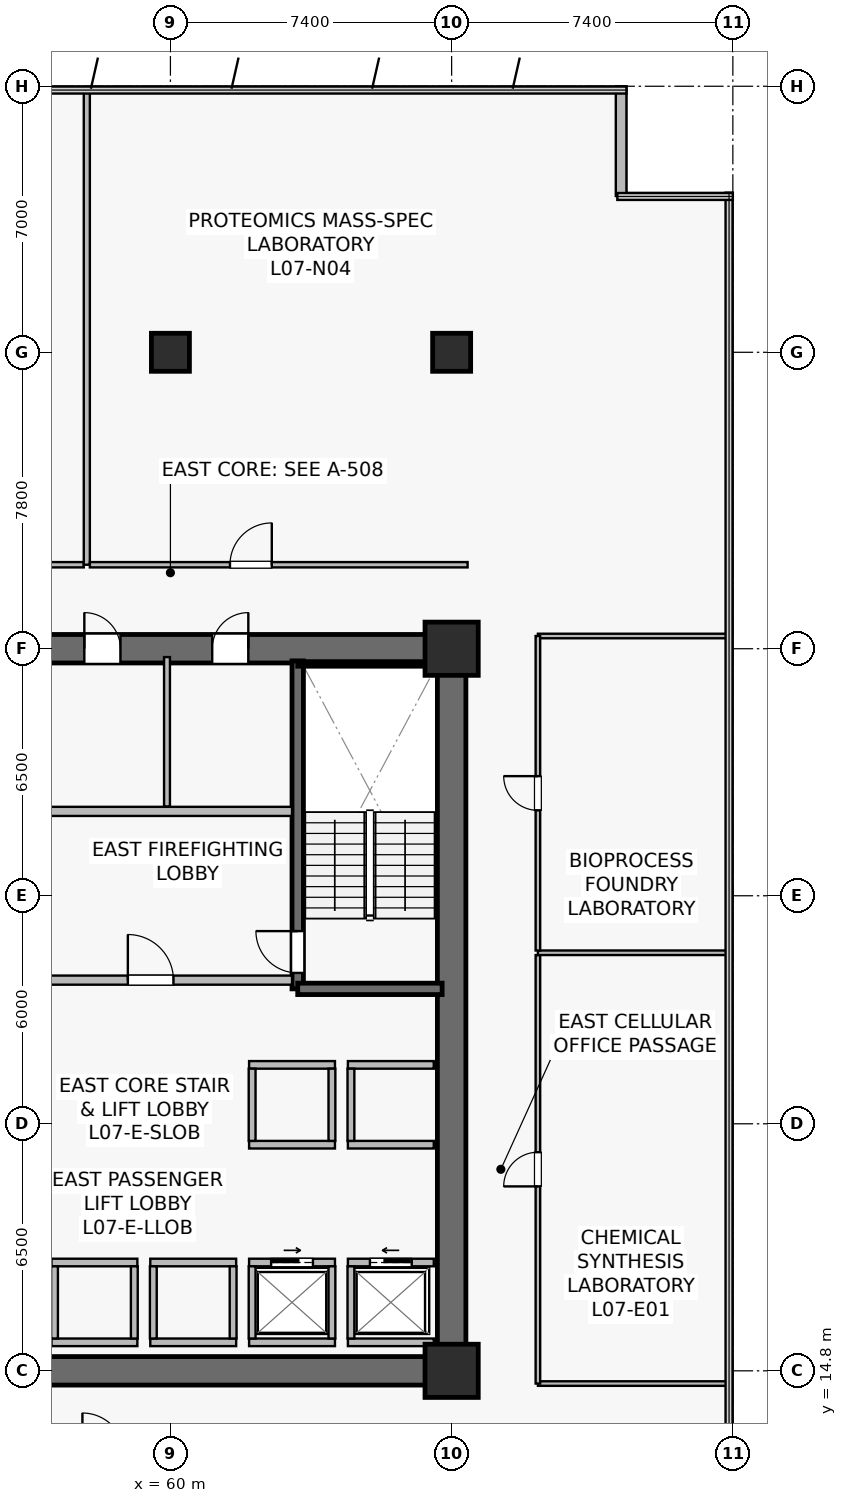
"""IFC4 building model, lengths in metres.
Left out: names, types, materials, properties, quantities, classifications, styles, units other than length and angle.
Written with IfcOpenShell. Run it as: python <this file> out.ifc"""

import sys

from ifc_helpers import new_model, si_unit, direction, frame, frame_2d, origin, origin_2d, place, context, subcontext, project, spatial, rectangle, extrude, source, transform, mapped, element, fill, save


model = new_model("IFC4")
c1 = context("Model", 3, precision=1e-05, world=origin(), true_north=direction((0.0, 1.0)))
c2 = subcontext(c1, "Body", "Model", "MODEL_VIEW")
j1 = project(units=[si_unit("LENGTHUNIT", "METRE"), si_unit("PLANEANGLEUNIT", "RADIAN")], contexts=[c1])
p1 = place(None, origin())
s1 = spatial("IfcSite", under=j1, at=p1, CompositionType="ELEMENT")
p2 = place(p1, origin())
s2 = spatial("IfcBuilding", under=s1, at=p2, CompositionType="ELEMENT")
p3 = place(p2, frame((0.0, 0.0, 29.3)))
s3 = spatial("IfcBuildingStorey", under=s2, at=p3, CompositionType="ELEMENT", Elevation=29.3)
p4 = place(p3, frame((52.225, 14.8, 0.0), z_axis=(0.0, 0.0, 1.0), x_axis=(1.0, 0.0, 0.0)))
e1 = element("IfcWall", 1, at=p4, inside=s3, PredefinedType="SHEAR", context=c2, shape_type="SweptSolid", body=[
    extrude(rectangle(XDim=15.55, YDim=0.75, at=frame_2d((7.775, 0.0))), origin(), (0.0, 0.0, 1.0), 3.78),
])
p5 = place(p3, frame((52.225, 33.8, 0.0), z_axis=(0.0, 0.0, 1.0), x_axis=(1.0, 0.0, 0.0)))
e2 = element("IfcWall", 2, at=p5, inside=s3, PredefinedType="SHEAR", context=c2, shape_type="SweptSolid", body=[
    extrude(rectangle(XDim=15.55, YDim=0.75, at=frame_2d((7.775, 0.0))), origin(), (0.0, 0.0, 1.0), 3.78),
])
p6 = place(p5, frame((8.875, 0.0, 0.0)))
e3 = element("IfcOpeningElement", 3, at=p6, cuts=e2, PredefinedType="OPENING", context=c2, shape_type="SweptSolid", body=[
    extrude(rectangle(XDim=0.95, YDim=2.15, at=frame_2d((0.475, 1.075))), frame((0.0, 0.385, 0.0), z_axis=(0.0, -1.0, 0.0), x_axis=(1.0, 0.0, 0.0)), (0.0, 0.0, 1.0), 0.77),
])
p7 = place(p5, frame((5.51, 0.0, 0.0)))
e4 = element("IfcOpeningElement", 4, at=p7, cuts=e2, PredefinedType="OPENING", context=c2, shape_type="SweptSolid", body=[
    extrude(rectangle(XDim=0.95, YDim=2.15, at=frame_2d((0.475, 1.075))), frame((0.0, 0.385, 0.0), z_axis=(0.0, -1.0, 0.0), x_axis=(1.0, 0.0, 0.0)), (0.0, 0.0, 1.0), 0.77),
])
p8 = place(p5, frame((2.11, 0.0, 0.0)))
e5 = element("IfcOpeningElement", 5, at=p8, cuts=e2, PredefinedType="OPENING", context=c2, shape_type="SweptSolid", body=[
    extrude(rectangle(XDim=0.95, YDim=2.15, at=frame_2d((0.475, 1.075))), frame((0.0, 0.385, 0.0), z_axis=(0.0, -1.0, 0.0), x_axis=(1.0, 0.0, 0.0)), (0.0, 0.0, 1.0), 0.77),
])
p9 = place(p3, frame((67.4, 15.175, 0.0), z_axis=(0.0, 0.0, 1.0), x_axis=(0.0, 1.0, 0.0)))
e6 = element("IfcWall", 6, at=p9, inside=s3, PredefinedType="SHEAR", context=c2, shape_type="SweptSolid", body=[
    extrude(rectangle(XDim=18.25, YDim=0.75, at=frame_2d((9.125, 0.0))), origin(), (0.0, 0.0, 1.0), 3.78),
])
p10 = place(p3, frame((63.35, 24.85, 0.0), z_axis=(0.0, 0.0, 1.0), x_axis=(0.0, 1.0, 0.0)))
e7 = element("IfcWall", 7, at=p10, inside=s3, PredefinedType="SHEAR", context=c2, shape_type="SweptSolid", body=[
    extrude(rectangle(XDim=8.63, YDim=0.3, at=frame_2d((4.315, 0.0))), origin(), (0.0, 0.0, 1.0), 3.78),
])
p11 = place(p10, frame((0.42, 0.0, 0.0)))
e8 = element("IfcOpeningElement", 8, at=p11, cuts=e7, PredefinedType="OPENING", context=c2, shape_type="SweptSolid", body=[
    extrude(rectangle(XDim=1.1, YDim=2.15, at=frame_2d((0.55, 1.075))), frame((0.0, 0.16, 0.0), z_axis=(0.0, -1.0, 0.0), x_axis=(1.0, 0.0, 0.0)), (0.0, 0.0, 1.0), 0.32),
])
p12 = place(p3, frame((63.35, 24.85, 0.0), z_axis=(0.0, 0.0, 1.0), x_axis=(1.0, 0.0, 0.0)))
e9 = element("IfcWall", 9, at=p12, inside=s3, PredefinedType="SHEAR", context=c2, shape_type="SweptSolid", body=[
    extrude(rectangle(XDim=3.8, YDim=0.3, at=frame_2d((1.9, 0.0))), origin(), (0.0, 0.0, 1.0), 3.78),
])
p13 = place(p3, frame((63.35, 33.4, 0.0), z_axis=(0.0, 0.0, 1.0), x_axis=(1.0, 0.0, 0.0)))
e10 = element("IfcWall", 10, at=p13, inside=s3, PredefinedType="SOLIDWALL", context=c2, shape_type="SweptSolid", body=[
    extrude(rectangle(XDim=3.72, YDim=0.12, at=frame_2d((1.86, 0.0))), origin(), (0.0, 0.0, 1.0), 3.78),
])
m1 = source(origin(), c2, "Body", "SweptSolid", [
    extrude(rectangle(XDim=1.4, YDim=1.4, at=origin_2d()), origin(), (0.0, 0.0, 1.0), 4.1),
])
for number, where, z_axis, x_axis in (
    (11, (67.4, 14.8, 0.0), (0.0, 0.0, 1.0), (1.0, 0.0, 0.0)),
    (12, (67.4, 33.8, 0.0), (0.0, 0.0, 1.0), (1.0, 0.0, 0.0)),
):
    element("IfcColumn", number, at=place(p3, frame(where, z_axis=z_axis, x_axis=x_axis)), inside=s3, PredefinedType="COLUMN", context=c2, shape_type="MappedRepresentation", body=[
        mapped(m1, transform((0.0, 0.0, 0.0), scale=1.0)),
    ])
m2 = source(origin(), c2, "Body", "SweptSolid", [
    extrude(rectangle(XDim=1.0, YDim=1.0, at=origin_2d()), origin(), (0.0, 0.0, 1.0), 4.1),
])
for number, where, z_axis, x_axis in (
    (13, (60.0, 41.6, 0.0), (0.0, 0.0, 1.0), (1.0, 0.0, 0.0)),
    (14, (67.4, 41.6, 0.0), (0.0, 0.0, 1.0), (1.0, 0.0, 0.0)),
):
    element("IfcColumn", number, at=place(p3, frame(where, z_axis=z_axis, x_axis=x_axis)), inside=s3, PredefinedType="COLUMN", context=c2, shape_type="MappedRepresentation", body=[
        mapped(m2, transform((0.0, 0.0, 0.0), scale=1.0)),
    ])
p14 = place(p3, frame((71.86, 45.712, 0.0), z_axis=(0.0, 0.0, 1.0), x_axis=(0.0, 1.0, 0.0)))
e15 = element("IfcWall", 15, at=p14, inside=s3, PredefinedType="STANDARD", context=c2, shape_type="SweptSolid", body=[
    extrude(rectangle(XDim=2.888, YDim=0.28, at=frame_2d((1.444, 0.0))), origin(), (0.0, 0.0, 1.0), 3.78),
])
p15 = place(p3, frame((56.28, 25.08, 0.0), z_axis=(0.0, 0.0, 1.0), x_axis=(1.0, 0.0, 0.0)))
e16 = element("IfcWall", 16, at=p15, inside=s3, PredefinedType="SOLIDWALL", context=c2, shape_type="SweptSolid", body=[
    extrude(rectangle(XDim=6.92, YDim=0.24, at=frame_2d((3.46, 0.0))), origin(), (0.0, 0.0, 1.0), 3.065),
])
p16 = place(p15, frame((2.6, 0.0, 0.0)))
e17 = element("IfcOpeningElement", 17, at=p16, cuts=e16, PredefinedType="OPENING", context=c2, shape_type="SweptSolid", body=[
    extrude(rectangle(XDim=1.2, YDim=2.16, at=frame_2d((0.6, 1.08))), frame((0.0, 0.13, 0.0), z_axis=(0.0, -1.0, 0.0), x_axis=(1.0, 0.0, 0.0)), (0.0, 0.0, 1.0), 0.26),
])
p17 = place(p3, frame((56.28, 29.52, 0.0), z_axis=(0.0, 0.0, 1.0), x_axis=(1.0, 0.0, 0.0)))
e18 = element("IfcWall", 18, at=p17, inside=s3, PredefinedType="SOLIDWALL", context=c2, shape_type="SweptSolid", body=[
    extrude(rectangle(XDim=6.92, YDim=0.24, at=frame_2d((3.46, 0.0))), origin(), (0.0, 0.0, 1.0), 3.065),
])
p18 = place(p3, frame((64.67, 17.65, 0.0), z_axis=(0.0, 0.0, 1.0), x_axis=(1.0, 0.0, 0.0)))
e19 = element("IfcWall", 19, at=p18, inside=s3, PredefinedType="SOLIDWALL", context=c2, shape_type="SweptSolid", body=[
    extrude(rectangle(XDim=2.26, YDim=0.2, at=frame_2d((1.13, 0.0))), origin(), (0.0, 0.0, 1.0), 3.78),
])
p19 = place(p18, frame((0.58, 0.0, 0.0)))
e20 = element("IfcOpeningElement", 20, at=p19, cuts=e19, PredefinedType="OPENING", context=c2, shape_type="SweptSolid", body=[
    extrude(rectangle(XDim=1.1, YDim=2.22, at=frame_2d((0.55, 1.11))), frame((0.0, 0.11, 0.0), z_axis=(0.0, -1.0, 0.0), x_axis=(1.0, 0.0, 0.0)), (0.0, 0.0, 1.0), 0.22),
])
p20 = place(p3, frame((64.67, 15.55, 0.0), z_axis=(0.0, 0.0, 1.0), x_axis=(1.0, 0.0, 0.0)))
e21 = element("IfcWall", 21, at=p20, inside=s3, PredefinedType="SOLIDWALL", context=c2, shape_type="SweptSolid", body=[
    extrude(rectangle(XDim=2.26, YDim=0.2, at=frame_2d((1.13, 0.0))), origin(), (0.0, 0.0, 1.0), 3.78),
])
p21 = place(p3, frame((64.75, 15.65, 0.0), z_axis=(0.0, 0.0, 1.0), x_axis=(0.0, 1.0, 0.0)))
e22 = element("IfcWall", 22, at=p21, inside=s3, PredefinedType="SOLIDWALL", context=c2, shape_type="SweptSolid", body=[
    extrude(rectangle(XDim=1.9, YDim=0.18, at=frame_2d((0.95, 0.0))), origin(), (0.0, 0.0, 1.0), 3.78),
])
p22 = place(p3, frame((62.07, 17.65, 0.0), z_axis=(0.0, 0.0, 1.0), x_axis=(1.0, 0.0, 0.0)))
e23 = element("IfcWall", 23, at=p22, inside=s3, PredefinedType="SOLIDWALL", context=c2, shape_type="SweptSolid", body=[
    extrude(rectangle(XDim=2.26, YDim=0.2, at=frame_2d((1.13, 0.0))), origin(), (0.0, 0.0, 1.0), 3.78),
])
p23 = place(p22, frame((0.58, 0.0, 0.0)))
e24 = element("IfcOpeningElement", 24, at=p23, cuts=e23, PredefinedType="OPENING", context=c2, shape_type="SweptSolid", body=[
    extrude(rectangle(XDim=1.1, YDim=2.22, at=frame_2d((0.55, 1.11))), frame((0.0, 0.11, 0.0), z_axis=(0.0, -1.0, 0.0), x_axis=(1.0, 0.0, 0.0)), (0.0, 0.0, 1.0), 0.22),
])
p24 = place(p3, frame((62.07, 15.55, 0.0), z_axis=(0.0, 0.0, 1.0), x_axis=(1.0, 0.0, 0.0)))
e25 = element("IfcWall", 25, at=p24, inside=s3, PredefinedType="SOLIDWALL", context=c2, shape_type="SweptSolid", body=[
    extrude(rectangle(XDim=2.26, YDim=0.2, at=frame_2d((1.13, 0.0))), origin(), (0.0, 0.0, 1.0), 3.78),
])
for number, where, z_axis, x_axis in (
    (26, (62.15, 15.65, 0.0), (0.0, 0.0, 1.0), (0.0, 1.0, 0.0)),
    (27, (64.25, 15.65, 0.0), (0.0, 0.0, 1.0), (0.0, 1.0, 0.0)),
):
    element("IfcWall", number, at=place(p3, frame(where, z_axis=z_axis, x_axis=x_axis)), inside=s3, PredefinedType="SOLIDWALL", context=c2, shape_type="SweptSolid", body=[
        extrude(rectangle(XDim=1.9, YDim=0.18, at=frame_2d((0.95, 0.0))), origin(), (0.0, 0.0, 1.0), 3.78),
    ])
for number, where, z_axis, x_axis in (
    (28, (59.47, 17.65, 0.0), (0.0, 0.0, 1.0), (1.0, 0.0, 0.0)),
    (29, (59.47, 15.55, 0.0), (0.0, 0.0, 1.0), (1.0, 0.0, 0.0)),
):
    element("IfcWall", number, at=place(p3, frame(where, z_axis=z_axis, x_axis=x_axis)), inside=s3, PredefinedType="SOLIDWALL", context=c2, shape_type="SweptSolid", body=[
        extrude(rectangle(XDim=2.26, YDim=0.2, at=frame_2d((1.13, 0.0))), origin(), (0.0, 0.0, 1.0), 3.065),
    ])
for number, where, z_axis, x_axis in (
    (30, (59.55, 15.65, 0.0), (0.0, 0.0, 1.0), (0.0, 1.0, 0.0)),
    (31, (61.65, 15.65, 0.0), (0.0, 0.0, 1.0), (0.0, 1.0, 0.0)),
):
    element("IfcWall", number, at=place(p3, frame(where, z_axis=z_axis, x_axis=x_axis)), inside=s3, PredefinedType="SOLIDWALL", context=c2, shape_type="SweptSolid", body=[
        extrude(rectangle(XDim=1.9, YDim=0.18, at=frame_2d((0.95, 0.0))), origin(), (0.0, 0.0, 1.0), 3.78),
    ])
for number, where, z_axis, x_axis in (
    (32, (56.87, 17.65, 0.0), (0.0, 0.0, 1.0), (1.0, 0.0, 0.0)),
    (33, (56.87, 15.55, 0.0), (0.0, 0.0, 1.0), (1.0, 0.0, 0.0)),
):
    element("IfcWall", number, at=place(p3, frame(where, z_axis=z_axis, x_axis=x_axis)), inside=s3, PredefinedType="SOLIDWALL", context=c2, shape_type="SweptSolid", body=[
        extrude(rectangle(XDim=2.26, YDim=0.2, at=frame_2d((1.13, 0.0))), origin(), (0.0, 0.0, 1.0), 3.78),
    ])
for number, where, z_axis, x_axis in (
    (34, (56.95, 15.65, 0.0), (0.0, 0.0, 1.0), (0.0, 1.0, 0.0)),
    (35, (59.05, 15.65, 0.0), (0.0, 0.0, 1.0), (0.0, 1.0, 0.0)),
):
    element("IfcWall", number, at=place(p3, frame(where, z_axis=z_axis, x_axis=x_axis)), inside=s3, PredefinedType="SOLIDWALL", context=c2, shape_type="SweptSolid", body=[
        extrude(rectangle(XDim=1.9, YDim=0.18, at=frame_2d((0.95, 0.0))), origin(), (0.0, 0.0, 1.0), 3.78),
    ])
for number, where, z_axis, x_axis in (
    (36, (64.67, 20.75, 0.0), (0.0, 0.0, 1.0), (1.0, 0.0, 0.0)),
    (37, (64.67, 22.85, 0.0), (0.0, 0.0, 1.0), (1.0, 0.0, 0.0)),
):
    element("IfcWall", number, at=place(p3, frame(where, z_axis=z_axis, x_axis=x_axis)), inside=s3, PredefinedType="SOLIDWALL", context=c2, shape_type="SweptSolid", body=[
        extrude(rectangle(XDim=2.26, YDim=0.2, at=frame_2d((1.13, 0.0))), origin(), (0.0, 0.0, 1.0), 3.78),
    ])
p25 = place(p3, frame((64.75, 20.85, 0.0), z_axis=(0.0, 0.0, 1.0), x_axis=(0.0, 1.0, 0.0)))
e38 = element("IfcWall", 38, at=p25, inside=s3, PredefinedType="SOLIDWALL", context=c2, shape_type="SweptSolid", body=[
    extrude(rectangle(XDim=1.9, YDim=0.18, at=frame_2d((0.95, 0.0))), origin(), (0.0, 0.0, 1.0), 3.78),
])
for number, where, z_axis, x_axis in (
    (39, (62.07, 20.75, 0.0), (0.0, 0.0, 1.0), (1.0, 0.0, 0.0)),
    (40, (62.07, 22.85, 0.0), (0.0, 0.0, 1.0), (1.0, 0.0, 0.0)),
):
    element("IfcWall", number, at=place(p3, frame(where, z_axis=z_axis, x_axis=x_axis)), inside=s3, PredefinedType="SOLIDWALL", context=c2, shape_type="SweptSolid", body=[
        extrude(rectangle(XDim=2.26, YDim=0.2, at=frame_2d((1.13, 0.0))), origin(), (0.0, 0.0, 1.0), 3.78),
    ])
for number, where, z_axis, x_axis in (
    (41, (62.15, 20.85, 0.0), (0.0, 0.0, 1.0), (0.0, 1.0, 0.0)),
    (42, (64.25, 20.85, 0.0), (0.0, 0.0, 1.0), (0.0, 1.0, 0.0)),
):
    element("IfcWall", number, at=place(p3, frame(where, z_axis=z_axis, x_axis=x_axis)), inside=s3, PredefinedType="SOLIDWALL", context=c2, shape_type="SweptSolid", body=[
        extrude(rectangle(XDim=1.9, YDim=0.18, at=frame_2d((0.95, 0.0))), origin(), (0.0, 0.0, 1.0), 3.78),
    ])
p26 = place(p3, frame((59.91, 29.65, 0.0), z_axis=(0.0, 0.0, 1.0), x_axis=(0.0, 1.0, 0.0)))
e43 = element("IfcWall", 43, at=p26, inside=s3, PredefinedType="PLUMBINGWALL", context=c2, shape_type="SweptSolid", body=[
    extrude(rectangle(XDim=3.93, YDim=0.155, at=frame_2d((1.965, 0.0))), origin(), (0.0, 0.0, 1.0), 3.065),
])
p27 = place(p3, frame((39.28, 36.01, 0.0), z_axis=(0.0, 0.0, 1.0), x_axis=(1.0, 0.0, 0.0)))
e44 = element("IfcWall", 44, at=p27, inside=s3, PredefinedType="PARTITIONING", context=c2, shape_type="SweptSolid", body=[
    extrude(rectangle(XDim=18.44, YDim=0.14, at=frame_2d((9.22, 0.0))), origin(), (0.0, 0.0, 1.0), 3.065),
])
p28 = place(p27, frame((9.169, 0.0, 0.0)))
e45 = element("IfcOpeningElement", 45, at=p28, cuts=e44, PredefinedType="OPENING", context=c2, shape_type="SweptSolid", body=[
    extrude(rectangle(XDim=1.1, YDim=2.18, at=frame_2d((0.55, 1.09))), frame((0.0, 0.08, 0.0), z_axis=(0.0, -1.0, 0.0), x_axis=(1.0, 0.0, 0.0)), (0.0, 0.0, 1.0), 0.16),
])
p29 = place(p3, frame((57.8, 36.01, 0.0), z_axis=(0.0, 0.0, 1.0), x_axis=(0.0, 1.0, 0.0)))
e46 = element("IfcWall", 46, at=p29, inside=s3, PredefinedType="PARTITIONING", context=c2, shape_type="SweptSolid", body=[
    extrude(rectangle(XDim=12.48, YDim=0.16, at=frame_2d((6.24, 0.0))), origin(), (0.0, 0.0, 1.0), 3.015),
])
p30 = place(p3, frame((57.88, 36.01, 0.0), z_axis=(0.0, 0.0, 1.0), x_axis=(1.0, 0.0, 0.0)))
e47 = element("IfcWall", 47, at=p30, inside=s3, PredefinedType="PARTITIONING", context=c2, shape_type="SweptSolid", body=[
    extrude(rectangle(XDim=9.94, YDim=0.14, at=frame_2d((4.97, 0.0))), origin(), (0.0, 0.0, 1.0), 3.065),
])
p31 = place(p30, frame((3.688, 0.0, 0.0)))
e48 = element("IfcOpeningElement", 48, at=p31, cuts=e47, PredefinedType="OPENING", context=c2, shape_type="SweptSolid", body=[
    extrude(rectangle(XDim=1.1, YDim=2.18, at=frame_2d((0.55, 1.09))), frame((0.0, 0.08, 0.0), z_axis=(0.0, -1.0, 0.0), x_axis=(1.0, 0.0, 0.0)), (0.0, 0.0, 1.0), 0.16),
])
for number, where, z_axis, x_axis in (
    (49, (69.67, 14.465, 0.0), (0.0, 0.0, 1.0), (1.0, 0.0, 0.0)),
    (50, (69.67, 34.135, 0.0), (0.0, 0.0, 1.0), (1.0, 0.0, 0.0)),
):
    element("IfcWall", number, at=place(p3, frame(where, z_axis=z_axis, x_axis=x_axis)), inside=s3, PredefinedType="PARTITIONING", context=c2, shape_type="SweptSolid", body=[
        extrude(rectangle(XDim=5.02, YDim=0.12, at=frame_2d((2.51, 0.0))), origin(), (0.0, 0.0, 1.0), 3.78),
    ])
p32 = place(p3, frame((69.67, 14.465, 0.0), z_axis=(0.0, 0.0, 1.0), x_axis=(0.0, 1.0, 0.0)))
e51 = element("IfcWall", 51, at=p32, inside=s3, PredefinedType="PARTITIONING", context=c2, shape_type="SweptSolid", body=[
    extrude(rectangle(XDim=11.275, YDim=0.12, at=frame_2d((5.637, 0.0))), origin(), (0.0, 0.0, 1.0), 3.78),
])
p33 = place(p32, frame((5.188, 0.0, 0.0)))
e52 = element("IfcOpeningElement", 52, at=p33, cuts=e51, PredefinedType="OPENING", context=c2, shape_type="SweptSolid", body=[
    extrude(rectangle(XDim=0.9, YDim=2.1, at=frame_2d((0.45, 1.05))), frame((0.0, 0.07, 0.0), z_axis=(0.0, -1.0, 0.0), x_axis=(1.0, 0.0, 0.0)), (0.0, 0.0, 1.0), 0.14),
])
p34 = place(p3, frame((69.67, 25.8, 0.0), z_axis=(0.0, 0.0, 1.0), x_axis=(1.0, 0.0, 0.0)))
e53 = element("IfcWall", 53, at=p34, inside=s3, PredefinedType="PARTITIONING", context=c2, shape_type="SweptSolid", body=[
    extrude(rectangle(XDim=5.02, YDim=0.12, at=frame_2d((2.51, 0.0))), origin(), (0.0, 0.0, 1.0), 3.78),
])
p35 = place(p3, frame((69.67, 25.86, 0.0), z_axis=(0.0, 0.0, 1.0), x_axis=(0.0, 1.0, 0.0)))
e54 = element("IfcWall", 54, at=p35, inside=s3, PredefinedType="PARTITIONING", context=c2, shape_type="SweptSolid", body=[
    extrude(rectangle(XDim=8.275, YDim=0.12, at=frame_2d((4.137, 0.0))), origin(), (0.0, 0.0, 1.0), 3.78),
])
p36 = place(p35, frame((3.688, 0.0, 0.0)))
e55 = element("IfcOpeningElement", 55, at=p36, cuts=e54, PredefinedType="OPENING", context=c2, shape_type="SweptSolid", body=[
    extrude(rectangle(XDim=0.9, YDim=2.1, at=frame_2d((0.45, 1.05))), frame((0.0, 0.07, 0.0), z_axis=(0.0, -1.0, 0.0), x_axis=(1.0, 0.0, 0.0)), (0.0, 0.0, 1.0), 0.14),
])
m3 = source(origin(), c2, "Body", "SweptSolid", [
    extrude(rectangle(XDim=1.1, YDim=2.15, at=frame_2d((0.55, 1.075))), frame((0.0, 0.025, 0.0), z_axis=(0.0, -1.0, 0.0), x_axis=(1.0, 0.0, 0.0)), (0.0, 0.0, 1.0), 0.05),
])
p37 = place(p11, origin())
e56 = element("IfcDoor", 56, at=p37, inside=s3, OperationType="SINGLE_SWING_RIGHT", PredefinedType="DOOR", context=c2, shape_type="MappedRepresentation", body=[
    mapped(m3, transform((0.0, 0.0, 0.0), scale=1.0)),
])
fill(e8, e56)
m4 = source(origin(), c2, "Body", "SweptSolid", [
    extrude(rectangle(XDim=1.2, YDim=2.16, at=frame_2d((0.6, 1.08))), frame((0.0, 0.025, 0.0), z_axis=(0.0, -1.0, 0.0), x_axis=(1.0, 0.0, 0.0)), (0.0, 0.0, 1.0), 0.05),
])
p38 = place(p16, origin())
e57 = element("IfcDoor", 57, at=p38, inside=s3, OperationType="SINGLE_SWING_LEFT", PredefinedType="DOOR", context=c2, shape_type="MappedRepresentation", body=[
    mapped(m4, transform((0.0, 0.0, 0.0), scale=1.0)),
])
fill(e17, e57)
m5 = source(origin(), c2, "Body", "SweptSolid", [
    extrude(rectangle(XDim=1.1, YDim=2.22, at=frame_2d((0.55, 1.11))), frame((0.0, 0.025, 0.0), z_axis=(0.0, -1.0, 0.0), x_axis=(1.0, 0.0, 0.0)), (0.0, 0.0, 1.0), 0.05),
])
p39 = place(p19, origin())
e58 = element("IfcDoor", 58, at=p39, inside=s3, OperationType="SLIDING_TO_LEFT", PredefinedType="USERDEFINED", context=c2, shape_type="MappedRepresentation", body=[
    mapped(m5, transform((0.0, 0.0, 0.0), scale=1.0)),
])
fill(e20, e58)
p40 = place(p23, origin())
e59 = element("IfcDoor", 59, at=p40, inside=s3, OperationType="SLIDING_TO_RIGHT", PredefinedType="USERDEFINED", context=c2, shape_type="MappedRepresentation", body=[
    mapped(m5, transform((0.0, 0.0, 0.0), scale=1.0)),
])
fill(e24, e59)
m6 = source(origin(), c2, "Body", "SweptSolid", [
    extrude(rectangle(XDim=0.95, YDim=2.15, at=frame_2d((0.475, 1.075))), frame((0.0, 0.025, 0.0), z_axis=(0.0, -1.0, 0.0), x_axis=(1.0, 0.0, 0.0)), (0.0, 0.0, 1.0), 0.05),
])
p41 = place(p6, origin())
e60 = element("IfcDoor", 60, at=p41, inside=s3, OperationType="SINGLE_SWING_RIGHT", PredefinedType="DOOR", context=c2, shape_type="MappedRepresentation", body=[
    mapped(m6, transform((0.0, 0.0, 0.0), scale=1.0)),
])
fill(e3, e60)
p42 = place(p7, origin())
e61 = element("IfcDoor", 61, at=p42, inside=s3, OperationType="SINGLE_SWING_LEFT", PredefinedType="DOOR", context=c2, shape_type="MappedRepresentation", body=[
    mapped(m6, transform((0.0, 0.0, 0.0), scale=1.0)),
])
fill(e4, e61)
m7 = source(origin(), c2, "Body", "SweptSolid", [
    extrude(rectangle(XDim=1.1, YDim=2.18, at=frame_2d((0.55, 1.09))), frame((0.0, 0.025, 0.0), z_axis=(0.0, -1.0, 0.0), x_axis=(1.0, 0.0, 0.0)), (0.0, 0.0, 1.0), 0.05),
])
p43 = place(p31, origin())
e62 = element("IfcDoor", 62, at=p43, inside=s3, OperationType="SINGLE_SWING_RIGHT", PredefinedType="DOOR", context=c2, shape_type="MappedRepresentation", body=[
    mapped(m7, transform((0.0, 0.0, 0.0), scale=1.0)),
])
fill(e48, e62)
m8 = source(origin(), c2, "Body", "SweptSolid", [
    extrude(rectangle(XDim=0.9, YDim=2.1, at=frame_2d((0.45, 1.05))), frame((0.0, 0.025, 0.0), z_axis=(0.0, -1.0, 0.0), x_axis=(1.0, 0.0, 0.0)), (0.0, 0.0, 1.0), 0.05),
])
p44 = place(p33, origin())
e63 = element("IfcDoor", 63, at=p44, inside=s3, OperationType="SINGLE_SWING_LEFT", PredefinedType="DOOR", context=c2, shape_type="MappedRepresentation", body=[
    mapped(m8, transform((0.0, 0.0, 0.0), scale=1.0)),
])
fill(e52, e63)
p45 = place(p36, origin())
e64 = element("IfcDoor", 64, at=p45, inside=s3, OperationType="SINGLE_SWING_RIGHT", PredefinedType="DOOR", context=c2, shape_type="MappedRepresentation", body=[
    mapped(m8, transform((0.0, 0.0, 0.0), scale=1.0)),
])
fill(e55, e64)
save(model, sys.argv[1])
